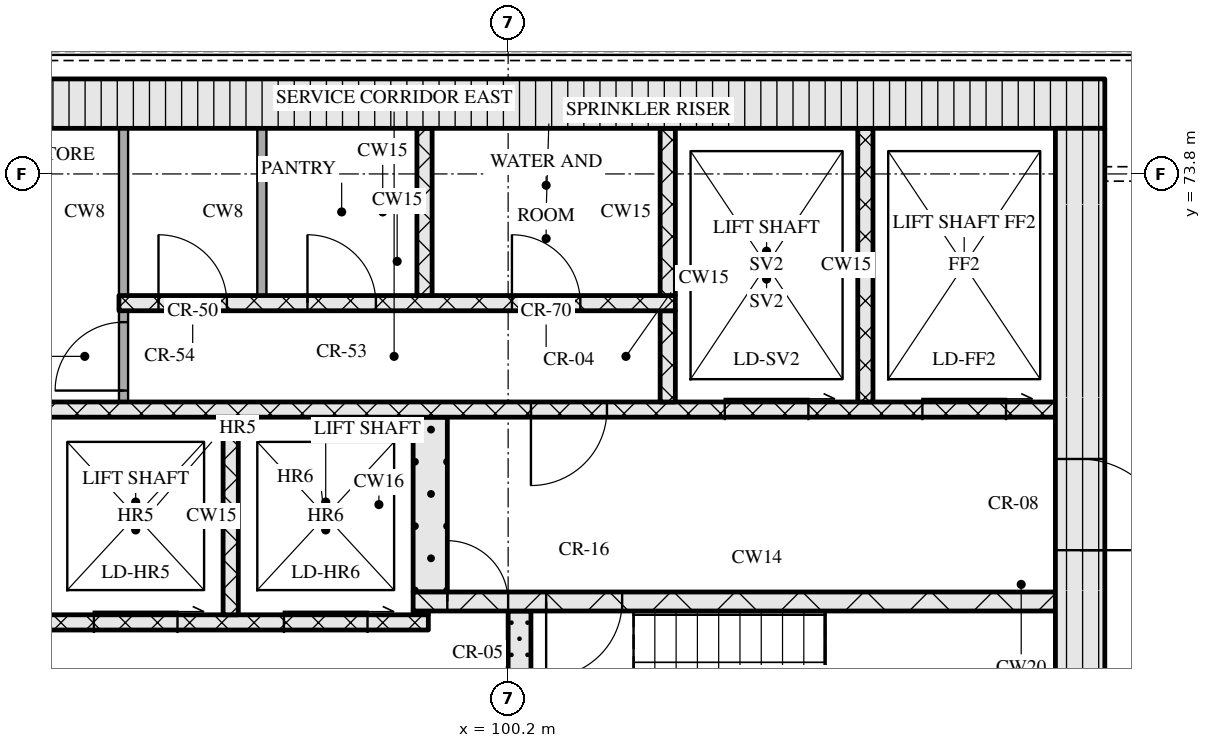
"""IFC4 building model, lengths in metres.
Left out: names, types, materials, properties, quantities, classifications, styles, units other than length and angle.
Written with IfcOpenShell. Run it as: python <this file> out.ifc"""

import sys

from ifc_helpers import new_model, si_unit, direction, frame, frame_2d, origin, place, context, subcontext, project, spatial, rectangle, extrude, element, fill, save


model = new_model("IFC4")
c1 = context("Model", 3, precision=1e-05, world=origin(), true_north=direction((0.0, 1.0)))
c2 = subcontext(c1, "Body", "Model", "MODEL_VIEW")
j1 = project(units=[si_unit("LENGTHUNIT", "METRE"), si_unit("PLANEANGLEUNIT", "RADIAN")], contexts=[c1])
p1 = place(None, origin())
s1 = spatial("IfcSite", under=j1, at=p1, CompositionType="ELEMENT")
p2 = place(p1, origin())
s2 = spatial("IfcBuilding", under=s1, at=p2, CompositionType="ELEMENT")
p3 = place(p2, frame((0.0, 0.0, 230.7)))
s3 = spatial("IfcBuildingStorey", under=s2, at=p3, CompositionType="ELEMENT", Elevation=230.7)
p4 = place(p3, frame((67.15, 74.725, 0.0), z_axis=(0.0, 0.0, 1.0), x_axis=(1.0, 0.0, 0.0)))
e1 = element("IfcWall", 1, at=p4, inside=s3, PredefinedType="SOLIDWALL", context=c2, shape_type="SweptSolid", body=[
    extrude(rectangle(XDim=40.9, YDim=0.65, at=frame_2d((20.45, 0.0))), origin(), (0.0, 0.0, 1.0), 3.32),
])
p5 = place(p3, frame((107.725, 62.4, 0.0), z_axis=(0.0, 0.0, 1.0), x_axis=(0.0, 1.0, 0.0)))
e2 = element("IfcWall", 2, at=p5, inside=s3, PredefinedType="SOLIDWALL", context=c2, shape_type="SweptSolid", body=[
    extrude(rectangle(XDim=12.0, YDim=0.65, at=frame_2d((6.0, 0.0))), origin(), (0.0, 0.0, 1.0), 3.32),
])
p6 = place(p5, frame((6.45, 0.0, 0.0)))
e3 = element("IfcOpeningElement", 3, at=p6, cuts=e2, PredefinedType="OPENING", context=c2, shape_type="SweptSolid", body=[
    extrude(rectangle(XDim=1.2, YDim=2.1, at=frame_2d((0.6, 1.05))), frame((0.0, 0.335, 0.0), z_axis=(0.0, -1.0, 0.0), x_axis=(1.0, 0.0, 0.0)), (0.0, 0.0, 1.0), 0.67),
])
p7 = place(p3, frame((100.35, 65.2, 0.0), z_axis=(0.0, 0.0, 1.0), x_axis=(0.0, 1.0, 0.0)))
e4 = element("IfcWall", 4, at=p7, inside=s3, PredefinedType="SOLIDWALL", context=c2, shape_type="SweptSolid", body=[
    extrude(rectangle(XDim=2.85, YDim=0.3, at=frame_2d((1.425, 0.0))), origin(), (0.0, 0.0, 1.0), 3.32),
])
p8 = place(p3, frame((76.05, 67.9, 0.0), z_axis=(0.0, 0.0, 1.0), x_axis=(1.0, 0.0, 0.0)))
e5 = element("IfcWall", 5, at=p8, inside=s3, PredefinedType="SOLIDWALL", context=c2, shape_type="SweptSolid", body=[
    extrude(rectangle(XDim=23.1, YDim=0.2, at=frame_2d((11.55, 0.0))), origin(), (0.0, 0.0, 1.0), 3.32),
])
p9 = place(p8, frame((1.35, 0.0, 0.0)))
e6 = element("IfcOpeningElement", 6, at=p9, cuts=e5, PredefinedType="OPENING", context=c2, shape_type="SweptSolid", body=[
    extrude(rectangle(XDim=0.9, YDim=2.1, at=frame_2d((0.45, 1.05))), frame((0.0, 0.11, 0.0), z_axis=(0.0, -1.0, 0.0), x_axis=(1.0, 0.0, 0.0)), (0.0, 0.0, 1.0), 0.22),
])
p10 = place(p8, frame((5.06, 0.0, 0.0)))
e7 = element("IfcOpeningElement", 7, at=p10, cuts=e5, PredefinedType="OPENING", context=c2, shape_type="SweptSolid", body=[
    extrude(rectangle(XDim=0.9, YDim=2.1, at=frame_2d((0.45, 1.05))), frame((0.0, 0.11, 0.0), z_axis=(0.0, -1.0, 0.0), x_axis=(1.0, 0.0, 0.0)), (0.0, 0.0, 1.0), 0.22),
])
p11 = place(p8, frame((8.45, 0.0, 0.0)))
e8 = element("IfcOpeningElement", 8, at=p11, cuts=e5, PredefinedType="OPENING", context=c2, shape_type="SweptSolid", body=[
    extrude(rectangle(XDim=0.9, YDim=2.1, at=frame_2d((0.45, 1.05))), frame((0.0, 0.11, 0.0), z_axis=(0.0, -1.0, 0.0), x_axis=(1.0, 0.0, 0.0)), (0.0, 0.0, 1.0), 0.22),
])
p12 = place(p8, frame((10.91, 0.0, 0.0)))
e9 = element("IfcOpeningElement", 9, at=p12, cuts=e5, PredefinedType="OPENING", context=c2, shape_type="SweptSolid", body=[
    extrude(rectangle(XDim=0.9, YDim=2.1, at=frame_2d((0.45, 1.05))), frame((0.0, 0.11, 0.0), z_axis=(0.0, -1.0, 0.0), x_axis=(1.0, 0.0, 0.0)), (0.0, 0.0, 1.0), 0.22),
])
p13 = place(p8, frame((13.55, 0.0, 0.0)))
e10 = element("IfcOpeningElement", 10, at=p13, cuts=e5, PredefinedType="OPENING", context=c2, shape_type="SweptSolid", body=[
    extrude(rectangle(XDim=1.0, YDim=2.1, at=frame_2d((0.5, 1.05))), frame((0.0, 0.11, 0.0), z_axis=(0.0, -1.0, 0.0), x_axis=(1.0, 0.0, 0.0)), (0.0, 0.0, 1.0), 0.22),
])
p14 = place(p8, frame((16.2, 0.0, 0.0)))
e11 = element("IfcOpeningElement", 11, at=p14, cuts=e5, PredefinedType="OPENING", context=c2, shape_type="SweptSolid", body=[
    extrude(rectangle(XDim=1.1, YDim=2.1, at=frame_2d((0.55, 1.05))), frame((0.0, 0.11, 0.0), z_axis=(0.0, -1.0, 0.0), x_axis=(1.0, 0.0, 0.0)), (0.0, 0.0, 1.0), 0.22),
])
p15 = place(p8, frame((18.7, 0.0, 0.0)))
e12 = element("IfcOpeningElement", 12, at=p15, cuts=e5, PredefinedType="OPENING", context=c2, shape_type="SweptSolid", body=[
    extrude(rectangle(XDim=1.1, YDim=2.1, at=frame_2d((0.55, 1.05))), frame((0.0, 0.11, 0.0), z_axis=(0.0, -1.0, 0.0), x_axis=(1.0, 0.0, 0.0)), (0.0, 0.0, 1.0), 0.22),
])
p16 = place(p8, frame((21.2, 0.0, 0.0)))
e13 = element("IfcOpeningElement", 13, at=p16, cuts=e5, PredefinedType="OPENING", context=c2, shape_type="SweptSolid", body=[
    extrude(rectangle(XDim=1.1, YDim=2.1, at=frame_2d((0.55, 1.05))), frame((0.0, 0.11, 0.0), z_axis=(0.0, -1.0, 0.0), x_axis=(1.0, 0.0, 0.0)), (0.0, 0.0, 1.0), 0.22),
])
p17 = place(p3, frame((96.55, 68.0, 0.0), z_axis=(0.0, 0.0, 1.0), x_axis=(0.0, 1.0, 0.0)))
e14 = element("IfcWall", 14, at=p17, inside=s3, PredefinedType="SOLIDWALL", context=c2, shape_type="SweptSolid", body=[
    extrude(rectangle(XDim=2.6, YDim=0.2, at=frame_2d((1.3, 0.0))), origin(), (0.0, 0.0, 1.0), 3.32),
])
p18 = place(p3, frame((98.95, 68.025, 0.0), z_axis=(0.0, 0.0, 1.0), x_axis=(1.0, 0.0, 0.0)))
e15 = element("IfcWall", 15, at=p18, inside=s3, PredefinedType="SOLIDWALL", context=c2, shape_type="SweptSolid", body=[
    extrude(rectangle(XDim=0.2, YDim=0.05, at=frame_2d((0.1, 0.0))), origin(), (0.0, 0.0, 1.0), 3.32),
])
p19 = place(p3, frame((98.95, 68.175, 0.0), z_axis=(0.0, 0.0, 1.0), x_axis=(1.0, 0.0, 0.0)))
e16 = element("IfcWall", 16, at=p19, inside=s3, PredefinedType="SOLIDWALL", context=c2, shape_type="SweptSolid", body=[
    extrude(rectangle(XDim=8.45, YDim=0.25, at=frame_2d((4.225, 0.0))), origin(), (0.0, 0.0, 1.0), 3.32),
])
p20 = place(p19, frame((0.45, 0.0, 0.0)))
e17 = element("IfcOpeningElement", 17, at=p20, cuts=e16, PredefinedType="OPENING", context=c2, shape_type="SweptSolid", body=[
    extrude(rectangle(XDim=0.8, YDim=2.1, at=frame_2d((0.4, 1.05))), frame((0.0, 0.135, 0.0), z_axis=(0.0, -1.0, 0.0), x_axis=(1.0, 0.0, 0.0)), (0.0, 0.0, 1.0), 0.27),
])
p21 = place(p19, frame((1.75, 0.0, 0.0)))
e18 = element("IfcOpeningElement", 18, at=p21, cuts=e16, PredefinedType="OPENING", context=c2, shape_type="SweptSolid", body=[
    extrude(rectangle(XDim=1.0, YDim=2.1, at=frame_2d((0.5, 1.05))), frame((0.0, 0.135, 0.0), z_axis=(0.0, -1.0, 0.0), x_axis=(1.0, 0.0, 0.0)), (0.0, 0.0, 1.0), 0.27),
])
p22 = place(p3, frame((99.175, 68.3, 0.0), z_axis=(0.0, 0.0, 1.0), x_axis=(0.0, 1.0, 0.0)))
e19 = element("IfcWall", 19, at=p22, inside=s3, PredefinedType="SOLIDWALL", context=c2, shape_type="SweptSolid", body=[
    extrude(rectangle(XDim=2.3, YDim=0.45, at=frame_2d((1.15, 0.0))), origin(), (0.0, 0.0, 1.0), 3.32),
])
p23 = place(p3, frame((67.8, 70.7, 0.0), z_axis=(0.0, 0.0, 1.0), x_axis=(1.0, 0.0, 0.0)))
e20 = element("IfcWall", 20, at=p23, inside=s3, PredefinedType="SOLIDWALL", context=c2, shape_type="SweptSolid", body=[
    extrude(rectangle(XDim=39.6, YDim=0.2, at=frame_2d((19.8, 0.0))), origin(), (0.0, 0.0, 1.0), 3.32),
])
p24 = place(p23, frame((0.65, 0.0, 0.0)))
e21 = element("IfcOpeningElement", 21, at=p24, cuts=e20, PredefinedType="OPENING", context=c2, shape_type="SweptSolid", body=[
    extrude(rectangle(XDim=1.1, YDim=2.1, at=frame_2d((0.55, 1.05))), frame((0.0, 0.11, 0.0), z_axis=(0.0, -1.0, 0.0), x_axis=(1.0, 0.0, 0.0)), (0.0, 0.0, 1.0), 0.22),
])
p25 = place(p23, frame((3.25, 0.0, 0.0)))
e22 = element("IfcOpeningElement", 22, at=p25, cuts=e20, PredefinedType="OPENING", context=c2, shape_type="SweptSolid", body=[
    extrude(rectangle(XDim=1.1, YDim=2.1, at=frame_2d((0.55, 1.05))), frame((0.0, 0.11, 0.0), z_axis=(0.0, -1.0, 0.0), x_axis=(1.0, 0.0, 0.0)), (0.0, 0.0, 1.0), 0.22),
])
p26 = place(p23, frame((5.9, 0.0, 0.0)))
e23 = element("IfcOpeningElement", 23, at=p26, cuts=e20, PredefinedType="OPENING", context=c2, shape_type="SweptSolid", body=[
    extrude(rectangle(XDim=1.0, YDim=2.1, at=frame_2d((0.5, 1.05))), frame((0.0, 0.11, 0.0), z_axis=(0.0, -1.0, 0.0), x_axis=(1.0, 0.0, 0.0)), (0.0, 0.0, 1.0), 0.22),
])
p27 = place(p23, frame((21.7, 0.0, 0.0)))
e24 = element("IfcOpeningElement", 24, at=p27, cuts=e20, PredefinedType="OPENING", context=c2, shape_type="SweptSolid", body=[
    extrude(rectangle(XDim=1.0, YDim=2.1, at=frame_2d((0.5, 1.05))), frame((0.0, 0.11, 0.0), z_axis=(0.0, -1.0, 0.0), x_axis=(1.0, 0.0, 0.0)), (0.0, 0.0, 1.0), 0.22),
])
p28 = place(p23, frame((32.7, 0.0, 0.0)))
e25 = element("IfcOpeningElement", 25, at=p28, cuts=e20, PredefinedType="OPENING", context=c2, shape_type="SweptSolid", body=[
    extrude(rectangle(XDim=1.0, YDim=2.1, at=frame_2d((0.5, 1.05))), frame((0.0, 0.11, 0.0), z_axis=(0.0, -1.0, 0.0), x_axis=(1.0, 0.0, 0.0)), (0.0, 0.0, 1.0), 0.22),
])
p29 = place(p23, frame((35.25, 0.0, 0.0)))
e26 = element("IfcOpeningElement", 26, at=p29, cuts=e20, PredefinedType="OPENING", context=c2, shape_type="SweptSolid", body=[
    extrude(rectangle(XDim=1.1, YDim=2.1, at=frame_2d((0.55, 1.05))), frame((0.0, 0.11, 0.0), z_axis=(0.0, -1.0, 0.0), x_axis=(1.0, 0.0, 0.0)), (0.0, 0.0, 1.0), 0.22),
])
p30 = place(p23, frame((37.85, 0.0, 0.0)))
e27 = element("IfcOpeningElement", 27, at=p30, cuts=e20, PredefinedType="OPENING", context=c2, shape_type="SweptSolid", body=[
    extrude(rectangle(XDim=1.1, YDim=2.1, at=frame_2d((0.55, 1.05))), frame((0.0, 0.11, 0.0), z_axis=(0.0, -1.0, 0.0), x_axis=(1.0, 0.0, 0.0)), (0.0, 0.0, 1.0), 0.22),
])
p31 = place(p3, frame((95.14, 70.8, 0.0), z_axis=(0.0, 0.0, 1.0), x_axis=(0.0, 1.0, 0.0)))
e28 = element("IfcWall", 28, at=p31, inside=s3, PredefinedType="PARTITIONING", context=c2, shape_type="SweptSolid", body=[
    extrude(rectangle(XDim=1.2, YDim=0.12, at=frame_2d((0.6, 0.0))), origin(), (0.0, 0.0, 1.0), 3.32),
])
p32 = place(p31, frame((0.15, 0.0, 0.0)))
e29 = element("IfcOpeningElement", 29, at=p32, cuts=e28, PredefinedType="OPENING", context=c2, shape_type="SweptSolid", body=[
    extrude(rectangle(XDim=0.9, YDim=2.1, at=frame_2d((0.45, 1.05))), frame((0.0, 0.07, 0.0), z_axis=(0.0, -1.0, 0.0), x_axis=(1.0, 0.0, 0.0)), (0.0, 0.0, 1.0), 0.14),
])
p33 = place(p3, frame((102.3, 70.8, 0.0), z_axis=(0.0, 0.0, 1.0), x_axis=(0.0, 1.0, 0.0)))
e30 = element("IfcWall", 30, at=p33, inside=s3, PredefinedType="SOLIDWALL", context=c2, shape_type="SweptSolid", body=[
    extrude(rectangle(XDim=1.2, YDim=0.2, at=frame_2d((0.6, 0.0))), origin(), (0.0, 0.0, 1.0), 3.32),
])
p34 = place(p3, frame((104.9, 70.8, 0.0), z_axis=(0.0, 0.0, 1.0), x_axis=(0.0, 1.0, 0.0)))
e31 = element("IfcWall", 31, at=p34, inside=s3, PredefinedType="SOLIDWALL", context=c2, shape_type="SweptSolid", body=[
    extrude(rectangle(XDim=3.6, YDim=0.2, at=frame_2d((1.8, 0.0))), origin(), (0.0, 0.0, 1.0), 3.32),
])
p35 = place(p3, frame((95.08, 72.1, 0.0), z_axis=(0.0, 0.0, 1.0), x_axis=(1.0, 0.0, 0.0)))
e32 = element("IfcWall", 32, at=p35, inside=s3, PredefinedType="SOLIDWALL", context=c2, shape_type="SweptSolid", body=[
    extrude(rectangle(XDim=7.32, YDim=0.2, at=frame_2d((3.66, 0.0))), origin(), (0.0, 0.0, 1.0), 3.32),
])
p36 = place(p35, frame((0.52, 0.0, 0.0)))
e33 = element("IfcOpeningElement", 33, at=p36, cuts=e32, PredefinedType="OPENING", context=c2, shape_type="SweptSolid", body=[
    extrude(rectangle(XDim=0.9, YDim=2.1, at=frame_2d((0.45, 1.05))), frame((0.0, 0.11, 0.0), z_axis=(0.0, -1.0, 0.0), x_axis=(1.0, 0.0, 0.0)), (0.0, 0.0, 1.0), 0.22),
])
p37 = place(p35, frame((2.48, 0.0, 0.0)))
e34 = element("IfcOpeningElement", 34, at=p37, cuts=e32, PredefinedType="OPENING", context=c2, shape_type="SweptSolid", body=[
    extrude(rectangle(XDim=0.9, YDim=2.1, at=frame_2d((0.45, 1.05))), frame((0.0, 0.11, 0.0), z_axis=(0.0, -1.0, 0.0), x_axis=(1.0, 0.0, 0.0)), (0.0, 0.0, 1.0), 0.22),
])
p38 = place(p35, frame((5.17, 0.0, 0.0)))
e35 = element("IfcOpeningElement", 35, at=p38, cuts=e32, PredefinedType="OPENING", context=c2, shape_type="SweptSolid", body=[
    extrude(rectangle(XDim=0.9, YDim=2.1, at=frame_2d((0.45, 1.05))), frame((0.0, 0.11, 0.0), z_axis=(0.0, -1.0, 0.0), x_axis=(1.0, 0.0, 0.0)), (0.0, 0.0, 1.0), 0.22),
])
for number, where, z_axis, x_axis in (
    (36, (95.14, 72.2, 0.0), (0.0, 0.0, 1.0), (0.0, 1.0, 0.0)),
    (37, (96.96, 72.2, 0.0), (0.0, 0.0, 1.0), (0.0, 1.0, 0.0)),
):
    element("IfcWall", number, at=place(p3, frame(where, z_axis=z_axis, x_axis=x_axis)), inside=s3, PredefinedType="PARTITIONING", context=c2, shape_type="SweptSolid", body=[
        extrude(rectangle(XDim=2.2, YDim=0.12, at=frame_2d((1.1, 0.0))), origin(), (0.0, 0.0, 1.0), 3.32),
    ])
for number, where, z_axis, x_axis in (
    (38, (99.1, 72.2, 0.0), (0.0, 0.0, 1.0), (0.0, 1.0, 0.0)),
    (39, (102.3, 72.2, 0.0), (0.0, 0.0, 1.0), (0.0, 1.0, 0.0)),
):
    element("IfcWall", number, at=place(p3, frame(where, z_axis=z_axis, x_axis=x_axis)), inside=s3, PredefinedType="SOLIDWALL", context=c2, shape_type="SweptSolid", body=[
        extrude(rectangle(XDim=2.2, YDim=0.2, at=frame_2d((1.1, 0.0))), origin(), (0.0, 0.0, 1.0), 3.32),
    ])
p39 = place(p15, origin())
e40 = element("IfcDoor", 40, at=p39, inside=s3, OperationType="SLIDING_TO_RIGHT", PredefinedType="DOOR", context=c2, shape_type="SweptSolid", body=[
    extrude(rectangle(XDim=1.1, YDim=2.1, at=frame_2d((0.55, 1.05))), frame((0.0, 0.025, 0.0), z_axis=(0.0, -1.0, 0.0), x_axis=(1.0, 0.0, 0.0)), (0.0, 0.0, 1.0), 0.05),
])
fill(e12, e40)
p40 = place(p16, origin())
e41 = element("IfcDoor", 41, at=p40, inside=s3, OperationType="SLIDING_TO_RIGHT", PredefinedType="DOOR", context=c2, shape_type="SweptSolid", body=[
    extrude(rectangle(XDim=1.1, YDim=2.1, at=frame_2d((0.55, 1.05))), frame((0.0, 0.025, 0.0), z_axis=(0.0, -1.0, 0.0), x_axis=(1.0, 0.0, 0.0)), (0.0, 0.0, 1.0), 0.05),
])
fill(e13, e41)
p41 = place(p20, origin())
e42 = element("IfcDoor", 42, at=p41, inside=s3, OperationType="SINGLE_SWING_LEFT", PredefinedType="DOOR", context=c2, shape_type="SweptSolid", body=[
    extrude(rectangle(XDim=0.8, YDim=2.1, at=frame_2d((0.4, 1.05))), frame((0.0, 0.025, 0.0), z_axis=(0.0, -1.0, 0.0), x_axis=(1.0, 0.0, 0.0)), (0.0, 0.0, 1.0), 0.05),
])
fill(e17, e42)
p42 = place(p21, origin())
e43 = element("IfcDoor", 43, at=p42, inside=s3, OperationType="SINGLE_SWING_RIGHT", PredefinedType="DOOR", context=c2, shape_type="SweptSolid", body=[
    extrude(rectangle(XDim=1.0, YDim=2.1, at=frame_2d((0.5, 1.05))), frame((0.0, 0.025, 0.0), z_axis=(0.0, -1.0, 0.0), x_axis=(1.0, 0.0, 0.0)), (0.0, 0.0, 1.0), 0.05),
])
fill(e18, e43)
p43 = place(p6, origin())
e44 = element("IfcDoor", 44, at=p43, inside=s3, OperationType="SINGLE_SWING_RIGHT", PredefinedType="DOOR", context=c2, shape_type="SweptSolid", body=[
    extrude(rectangle(XDim=1.2, YDim=2.1, at=frame_2d((0.6, 1.05))), frame((0.0, 0.025, 0.0), z_axis=(0.0, -1.0, 0.0), x_axis=(1.0, 0.0, 0.0)), (0.0, 0.0, 1.0), 0.05),
])
fill(e3, e44)
p44 = place(p28, origin())
e45 = element("IfcDoor", 45, at=p44, inside=s3, OperationType="SINGLE_SWING_RIGHT", PredefinedType="DOOR", context=c2, shape_type="SweptSolid", body=[
    extrude(rectangle(XDim=1.0, YDim=2.1, at=frame_2d((0.5, 1.05))), frame((0.0, 0.025, 0.0), z_axis=(0.0, -1.0, 0.0), x_axis=(1.0, 0.0, 0.0)), (0.0, 0.0, 1.0), 0.05),
])
fill(e25, e45)
p45 = place(p29, origin())
e46 = element("IfcDoor", 46, at=p45, inside=s3, OperationType="SLIDING_TO_RIGHT", PredefinedType="DOOR", context=c2, shape_type="SweptSolid", body=[
    extrude(rectangle(XDim=1.1, YDim=2.1, at=frame_2d((0.55, 1.05))), frame((0.0, 0.025, 0.0), z_axis=(0.0, -1.0, 0.0), x_axis=(1.0, 0.0, 0.0)), (0.0, 0.0, 1.0), 0.05),
])
fill(e26, e46)
p46 = place(p30, origin())
e47 = element("IfcDoor", 47, at=p46, inside=s3, OperationType="SLIDING_TO_RIGHT", PredefinedType="DOOR", context=c2, shape_type="SweptSolid", body=[
    extrude(rectangle(XDim=1.1, YDim=2.1, at=frame_2d((0.55, 1.05))), frame((0.0, 0.025, 0.0), z_axis=(0.0, -1.0, 0.0), x_axis=(1.0, 0.0, 0.0)), (0.0, 0.0, 1.0), 0.05),
])
fill(e27, e47)
p47 = place(p32, origin())
e48 = element("IfcDoor", 48, at=p47, inside=s3, OperationType="SINGLE_SWING_LEFT", PredefinedType="DOOR", context=c2, shape_type="SweptSolid", body=[
    extrude(rectangle(XDim=0.9, YDim=2.1, at=frame_2d((0.45, 1.05))), frame((0.0, 0.025, 0.0), z_axis=(0.0, -1.0, 0.0), x_axis=(1.0, 0.0, 0.0)), (0.0, 0.0, 1.0), 0.05),
])
fill(e29, e48)
p48 = place(p36, origin())
e49 = element("IfcDoor", 49, at=p48, inside=s3, OperationType="SINGLE_SWING_LEFT", PredefinedType="DOOR", context=c2, shape_type="SweptSolid", body=[
    extrude(rectangle(XDim=0.9, YDim=2.1, at=frame_2d((0.45, 1.05))), frame((0.0, 0.025, 0.0), z_axis=(0.0, -1.0, 0.0), x_axis=(1.0, 0.0, 0.0)), (0.0, 0.0, 1.0), 0.05),
])
fill(e33, e49)
p49 = place(p37, origin())
e50 = element("IfcDoor", 50, at=p49, inside=s3, OperationType="SINGLE_SWING_LEFT", PredefinedType="DOOR", context=c2, shape_type="SweptSolid", body=[
    extrude(rectangle(XDim=0.9, YDim=2.1, at=frame_2d((0.45, 1.05))), frame((0.0, 0.025, 0.0), z_axis=(0.0, -1.0, 0.0), x_axis=(1.0, 0.0, 0.0)), (0.0, 0.0, 1.0), 0.05),
])
fill(e34, e50)
p50 = place(p38, origin())
e51 = element("IfcDoor", 51, at=p50, inside=s3, OperationType="SINGLE_SWING_LEFT", PredefinedType="DOOR", context=c2, shape_type="SweptSolid", body=[
    extrude(rectangle(XDim=0.9, YDim=2.1, at=frame_2d((0.45, 1.05))), frame((0.0, 0.025, 0.0), z_axis=(0.0, -1.0, 0.0), x_axis=(1.0, 0.0, 0.0)), (0.0, 0.0, 1.0), 0.05),
])
fill(e35, e51)
save(model, sys.argv[1])
